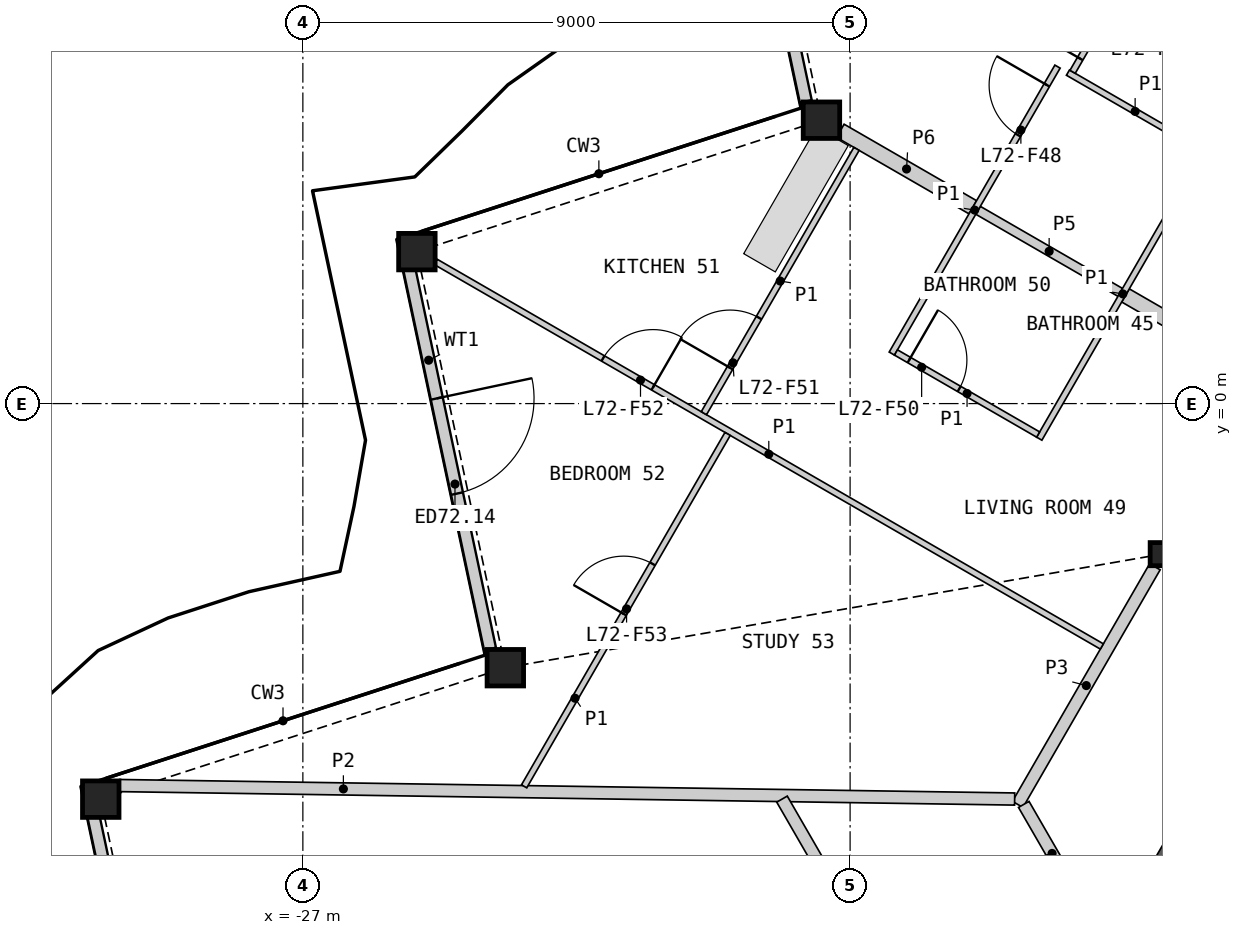
"""IFC4 building model, lengths in metres.
Left out: names, types, materials, properties, quantities, classifications, styles, units other than length and angle.
Written with IfcOpenShell. Run it as: python <this file> out.ifc"""

import sys

from ifc_helpers import new_model, si_unit, direction, frame, frame_2d, origin, origin_2d, place, context, subcontext, project, spatial, polyline, rectangle, hollow_rectangle, i_section, outline, extrude, element, fill, save


model = new_model("IFC4")
c1 = context("Model", 3, precision=1e-05, world=origin(), true_north=direction((0.0, 1.0)))
c2 = subcontext(c1, "Body", "Model", "MODEL_VIEW")
j1 = project(units=[si_unit("LENGTHUNIT", "METRE"), si_unit("PLANEANGLEUNIT", "RADIAN")], contexts=[c1])
p1 = place(None, origin())
s1 = spatial("IfcSite", under=j1, at=p1, CompositionType="ELEMENT")
p2 = place(p1, origin())
s2 = spatial("IfcBuilding", under=s1, at=p2, CompositionType="ELEMENT")
p3 = place(p2, frame((0.0, 0.0, 325.6)))
s3 = spatial("IfcBuildingStorey", under=s2, at=p3, CompositionType="ELEMENT", Elevation=325.6)
for number, where, z_axis, x_axis in (
    (1, (-18.471, 4.661, 0.0), (0.0, 0.0, 1.0), (1.0, 0.0, 0.0)),
    (2, (-25.125, 2.499, 0.0), (0.0, 0.0, 1.0), (1.0, 0.0, 0.0)),
    (3, (-23.67, -4.344, 0.0), (0.0, 0.0, 1.0), (1.0, 0.0, 0.0)),
    (4, (-30.324, -6.506, 0.0), (0.0, 0.0, 1.0), (1.0, 0.0, 0.0)),
):
    element("IfcColumn", number, at=place(p3, frame(where, z_axis=z_axis, x_axis=x_axis)), inside=s3, PredefinedType="COLUMN", context=c2, shape_type="SweptSolid", body=[
        extrude(hollow_rectangle(XDim=0.6, YDim=0.6, WallThickness=0.04, at=origin_2d()), origin(), (0.0, 0.0, 1.0), 3.4),
    ])
p4 = place(p3, frame((-12.868, -2.476, 0.0), z_axis=(0.0, 0.0, 1.0), x_axis=(1.0, 0.0, 0.0)))
e5 = element("IfcColumn", 5, at=p4, inside=s3, PredefinedType="COLUMN", context=c2, shape_type="SweptSolid", body=[
    extrude(i_section(OverallWidth=0.396, OverallDepth=0.381, WebThickness=0.019, FlangeThickness=0.03, at=origin_2d()), origin(), (0.0, 0.0, 1.0), 3.4),
])
p5 = place(p3, frame((-20.073, 11.294, 0.0), z_axis=(0.0, 0.0, 1.0), x_axis=(0.207893978909, -0.978151365349, 0.0)))
e6 = element("IfcWall", 6, at=p5, inside=s3, PredefinedType="SOLIDWALL", context=c2, shape_type="SweptSolid", body=[
    extrude(rectangle(XDim=6.466, YDim=0.2, at=frame_2d((3.233, 0.0))), origin(), (0.0, 0.0, 1.0), 2.488),
])
p6 = place(p5, frame((2.261, 0.0, 0.0)))
e7 = element("IfcOpeningElement", 7, at=p6, cuts=e6, PredefinedType="OPENING", context=c2, shape_type="SweptSolid", body=[
    extrude(rectangle(XDim=1.6, YDim=2.25, at=frame_2d((0.8, 1.125))), frame((0.0, 0.11, 0.0), z_axis=(0.0, -1.0, 0.0), x_axis=(1.0, 0.0, 0.0)), (0.0, 0.0, 1.0), 0.22),
])
p7 = place(p3, frame((-25.268, 2.297, 0.0), z_axis=(0.0, 0.0, 1.0), x_axis=(0.207937232358, -0.978142171363, 0.0)))
e8 = element("IfcWall", 8, at=p7, inside=s3, PredefinedType="SOLIDWALL", context=c2, shape_type="SweptSolid", body=[
    extrude(rectangle(XDim=6.474, YDim=0.2, at=frame_2d((3.237, 0.0))), origin(), (0.0, 0.0, 1.0), 2.488),
])
p8 = place(p7, frame((2.261, 0.0, 0.0)))
e9 = element("IfcOpeningElement", 9, at=p8, cuts=e8, PredefinedType="OPENING", context=c2, shape_type="SweptSolid", body=[
    extrude(rectangle(XDim=1.6, YDim=2.25, at=frame_2d((0.8, 1.125))), frame((0.0, 0.11, 0.0), z_axis=(0.0, -1.0, 0.0), x_axis=(1.0, 0.0, 0.0)), (0.0, 0.0, 1.0), 0.22),
])
p9 = place(p3, frame((-30.462, -6.701, 0.0), z_axis=(0.0, 0.0, 1.0), x_axis=(0.207915966693, -0.978146691859, 0.0)))
e10 = element("IfcWall", 10, at=p9, inside=s3, PredefinedType="SOLIDWALL", context=c2, shape_type="SweptSolid", body=[
    extrude(rectangle(XDim=6.482, YDim=0.2, at=frame_2d((3.241, 0.0))), origin(), (0.0, 0.0, 1.0), 2.488),
])
p10 = place(p9, frame((2.261, 0.0, 0.0)))
e11 = element("IfcOpeningElement", 11, at=p10, cuts=e10, PredefinedType="OPENING", context=c2, shape_type="SweptSolid", body=[
    extrude(rectangle(XDim=1.6, YDim=2.25, at=frame_2d((0.8, 1.125))), frame((0.0, 0.11, 0.0), z_axis=(0.0, -1.0, 0.0), x_axis=(1.0, 0.0, 0.0)), (0.0, 0.0, 1.0), 0.22),
])
p11 = place(p3, origin())
e12 = element("IfcWall", 12, at=p11, inside=s3, PredefinedType="SHEAR", context=c2, shape_type="SweptSolid", body=[
    extrude(outline(polyline([(-12.48, -6.606), (-11.961, -6.906), (-11.961, -7.506), (-13.0, -7.506), (-12.48, -6.606)])), origin(), (0.0, 0.0, 1.0), 3.1),
])
p12 = place(p3, frame((-15.244, -6.592, 0.0), z_axis=(0.0, 0.0, 1.0), x_axis=(0.49999094734, 0.866030630277, 0.0)))
e13 = element("IfcWall", 13, at=p12, inside=s3, PredefinedType="PARTITIONING", context=c2, shape_type="SweptSolid", body=[
    extrude(rectangle(XDim=4.513, YDim=0.2, at=frame_2d((2.256, 0.0))), origin(), (0.0, 0.0, 1.0), 3.1),
])
p13 = place(p3, frame((-15.144, -6.592, 0.0), z_axis=(0.0, 0.0, 1.0), x_axis=(0.499958791762, -0.866049194065, 0.0)))
e14 = element("IfcWall", 14, at=p13, inside=s3, PredefinedType="PARTITIONING", context=c2, shape_type="SweptSolid", body=[
    extrude(rectangle(XDim=3.726, YDim=0.2, at=frame_2d((1.863, 0.0))), origin(), (0.0, 0.0, 1.0), 3.1),
])
p14 = place(p13, frame((1.388, 0.0, 0.0)))
e15 = element("IfcOpeningElement", 15, at=p14, cuts=e14, PredefinedType="OPENING", context=c2, shape_type="SweptSolid", body=[
    extrude(rectangle(XDim=0.95, YDim=2.1, at=frame_2d((0.475, 1.05))), frame((0.0, 0.11, 0.0), z_axis=(0.0, -1.0, 0.0), x_axis=(1.0, 0.0, 0.0)), (0.0, 0.0, 1.0), 0.22),
])
p15 = place(p3, frame((-13.471, 1.779, 0.0), z_axis=(0.0, 0.0, 1.0), x_axis=(0.865989465428, -0.500062241894, 0.0)))
e16 = element("IfcWall", 16, at=p15, inside=s3, PredefinedType="PARTITIONING", context=c2, shape_type="SweptSolid", body=[
    extrude(rectangle(XDim=2.55, YDim=0.25, at=frame_2d((1.275, 0.0))), origin(), (0.0, 0.0, 1.0), 2.33),
])
p16 = place(p3, frame((-18.161, 4.487, 0.0), z_axis=(0.0, 0.0, 1.0), x_axis=(0.866012646713, -0.500022095245, 0.0)))
e17 = element("IfcWall", 17, at=p16, inside=s3, PredefinedType="PARTITIONING", context=c2, shape_type="SweptSolid", body=[
    extrude(rectangle(XDim=2.516, YDim=0.25, at=frame_2d((1.258, 0.0))), origin(), (0.0, 0.0, 1.0), 2.33),
])
p17 = place(p3, frame((-30.014, -6.282, 0.0), z_axis=(0.0, 0.0, 1.0), x_axis=(0.99988686643, -0.015041753265, 0.0)))
e18 = element("IfcWall", 18, at=p17, inside=s3, PredefinedType="PARTITIONING", context=c2, shape_type="SweptSolid", body=[
    extrude(rectangle(XDim=14.721, YDim=0.2, at=frame_2d((7.361, 0.0))), origin(), (0.0, 0.0, 1.0), 2.33),
])
p18 = place(p3, frame((-19.12, -6.506, 0.0), z_axis=(0.0, 0.0, 1.0), x_axis=(0.499978535015, -0.866037796245, 0.0)))
e19 = element("IfcWall", 19, at=p18, inside=s3, PredefinedType="PARTITIONING", context=c2, shape_type="SweptSolid", body=[
    extrude(rectangle(XDim=3.686, YDim=0.2, at=frame_2d((1.843, 0.0))), origin(), (0.0, 0.0, 1.0), 2.33),
])
p19 = place(p3, frame((-15.896, 3.179, 0.0), z_axis=(0.0, 0.0, 1.0), x_axis=(0.866059108428, -0.4999416173, 0.0)))
e20 = element("IfcWall", 20, at=p19, inside=s3, PredefinedType="PLUMBINGWALL", context=c2, shape_type="SweptSolid", body=[
    extrude(rectangle(XDim=2.7, YDim=0.15, at=frame_2d((1.35, 0.0))), origin(), (0.0, 0.0, 1.0), 2.33),
])
p20 = place(p3, frame((-24.815, 2.33, 0.0), z_axis=(0.0, 0.0, 1.0), x_axis=(0.866027776657, -0.499995890042, 0.0)))
e21 = element("IfcWall", 21, at=p20, inside=s3, PredefinedType="PARTITIONING", context=c2, shape_type="SweptSolid", body=[
    extrude(rectangle(XDim=12.649, YDim=0.1, at=frame_2d((6.325, 0.0))), origin(), (0.0, 0.0, 1.0), 2.33),
])
p21 = place(p20, frame((3.176, 0.0, 0.0)))
e22 = element("IfcOpeningElement", 22, at=p21, cuts=e21, PredefinedType="OPENING", context=c2, shape_type="SweptSolid", body=[
    extrude(rectangle(XDim=0.95, YDim=2.1, at=frame_2d((0.475, 1.05))), frame((0.0, 0.06, 0.0), z_axis=(0.0, -1.0, 0.0), x_axis=(1.0, 0.0, 0.0)), (0.0, 0.0, 1.0), 0.12),
])
p22 = place(p3, frame((-19.615, 11.325, 0.0), z_axis=(0.0, 0.0, 1.0), x_axis=(0.86602139559, -0.500006942333, 0.0)))
e23 = element("IfcWall", 23, at=p22, inside=s3, PredefinedType="PARTITIONING", context=c2, shape_type="SweptSolid", body=[
    extrude(rectangle(XDim=12.505, YDim=0.1, at=frame_2d((6.252, 0.0))), origin(), (0.0, 0.0, 1.0), 2.33),
])
p23 = place(p22, frame((6.28, 0.0, 0.0)))
e24 = element("IfcOpeningElement", 24, at=p23, cuts=e23, PredefinedType="OPENING", context=c2, shape_type="SweptSolid", body=[
    extrude(rectangle(XDim=0.95, YDim=2.1, at=frame_2d((0.475, 1.05))), frame((0.0, 0.06, 0.0), z_axis=(0.0, -1.0, 0.0), x_axis=(1.0, 0.0, 0.0)), (0.0, 0.0, 1.0), 0.12),
])
p24 = place(p3, frame((-23.361, -6.295, 0.0), z_axis=(0.0, 0.0, 1.0), x_axis=(0.499987686533, 0.866032512851, 0.0)))
e25 = element("IfcWall", 25, at=p24, inside=s3, PredefinedType="PARTITIONING", context=c2, shape_type="SweptSolid", body=[
    extrude(rectangle(XDim=6.693, YDim=0.1, at=frame_2d((3.347, 0.0))), origin(), (0.0, 0.0, 1.0), 2.33),
])
p25 = place(p24, frame((3.275, 0.0, 0.0)))
e26 = element("IfcOpeningElement", 26, at=p25, cuts=e25, PredefinedType="OPENING", context=c2, shape_type="SweptSolid", body=[
    extrude(rectangle(XDim=0.95, YDim=2.1, at=frame_2d((0.475, 1.05))), frame((0.0, 0.06, 0.0), z_axis=(0.0, -1.0, 0.0), x_axis=(1.0, 0.0, 0.0)), (0.0, 0.0, 1.0), 0.12),
])
p26 = place(p3, frame((-17.314, 0.823, 0.0), z_axis=(0.0, 0.0, 1.0), x_axis=(0.499988730927, 0.866031909889, 0.0)))
e27 = element("IfcWall", 27, at=p26, inside=s3, PredefinedType="PARTITIONING", context=c2, shape_type="SweptSolid", body=[
    extrude(rectangle(XDim=5.45, YDim=0.1, at=frame_2d((2.725, 0.0))), origin(), (0.0, 0.0, 1.0), 2.33),
])
p27 = place(p26, frame((4.15, 0.0, 0.0)))
e28 = element("IfcOpeningElement", 28, at=p27, cuts=e27, PredefinedType="OPENING", context=c2, shape_type="SweptSolid", body=[
    extrude(rectangle(XDim=0.95, YDim=2.1, at=frame_2d((0.475, 1.05))), frame((0.0, 0.06, 0.0), z_axis=(0.0, -1.0, 0.0), x_axis=(1.0, 0.0, 0.0)), (0.0, 0.0, 1.0), 0.12),
])
p28 = place(p3, frame((-14.889, -0.577, 0.0), z_axis=(0.0, 0.0, 1.0), x_axis=(0.500015767406, 0.866016300277, 0.0)))
e29 = element("IfcWall", 29, at=p28, inside=s3, PredefinedType="PARTITIONING", context=c2, shape_type="SweptSolid", body=[
    extrude(rectangle(XDim=5.5, YDim=0.1, at=frame_2d((2.75, 0.0))), origin(), (0.0, 0.0, 1.0), 2.33),
])
p29 = place(p3, frame((-20.405, -0.158, 0.0), z_axis=(0.0, 0.0, 1.0), x_axis=(0.499989096993, 0.866031698547, 0.0)))
e30 = element("IfcWall", 30, at=p29, inside=s3, PredefinedType="PARTITIONING", context=c2, shape_type="SweptSolid", body=[
    extrude(rectangle(XDim=5.02, YDim=0.1, at=frame_2d((2.51, 0.0))), origin(), (0.0, 0.0, 1.0), 2.33),
])
p30 = place(p29, frame((0.862, 0.0, 0.0)))
e31 = element("IfcOpeningElement", 31, at=p30, cuts=e30, PredefinedType="OPENING", context=c2, shape_type="SweptSolid", body=[
    extrude(rectangle(XDim=0.95, YDim=2.1, at=frame_2d((0.475, 1.05))), frame((0.0, 0.06, 0.0), z_axis=(0.0, -1.0, 0.0), x_axis=(1.0, 0.0, 0.0)), (0.0, 0.0, 1.0), 0.12),
])
p31 = place(p3, frame((-17.246, 0.841, 0.0), z_axis=(0.0, 0.0, 1.0), x_axis=(0.86599734893, -0.500048589285, 0.0)))
e32 = element("IfcWall", 32, at=p31, inside=s3, PredefinedType="PARTITIONING", context=c2, shape_type="SweptSolid", body=[
    extrude(rectangle(XDim=2.7, YDim=0.1, at=frame_2d((1.35, 0.0))), origin(), (0.0, 0.0, 1.0), 2.33),
])
p32 = place(p31, frame((0.25, 0.0, 0.0)))
e33 = element("IfcOpeningElement", 33, at=p32, cuts=e32, PredefinedType="OPENING", context=c2, shape_type="SweptSolid", body=[
    extrude(rectangle(XDim=0.95, YDim=2.1, at=frame_2d((0.475, 1.05))), frame((0.0, 0.06, 0.0), z_axis=(0.0, -1.0, 0.0), x_axis=(1.0, 0.0, 0.0)), (0.0, 0.0, 1.0), 0.12),
])
p33 = place(p3, frame((-14.417, 5.443, 0.0), z_axis=(0.0, 0.0, 1.0), x_axis=(0.865991210529, -0.500059219779, 0.0)))
e34 = element("IfcWall", 34, at=p33, inside=s3, PredefinedType="PARTITIONING", context=c2, shape_type="SweptSolid", body=[
    extrude(rectangle(XDim=2.552, YDim=0.1, at=frame_2d((1.276, 0.0))), origin(), (0.0, 0.0, 1.0), 2.33),
])
p34 = place(p3, frame((-14.341, 5.457, 0.0), z_axis=(0.0, 0.0, 1.0), x_axis=(0.499954846121, 0.866051471819, 0.0)))
e35 = element("IfcWall", 35, at=p34, inside=s3, PredefinedType="PARTITIONING", context=c2, shape_type="SweptSolid", body=[
    extrude(rectangle(XDim=2.395, YDim=0.1, at=frame_2d((1.197, 0.0))), origin(), (0.0, 0.0, 1.0), 2.33),
])
p35 = place(p34, frame((0.25, 0.0, 0.0)))
e36 = element("IfcOpeningElement", 36, at=p35, cuts=e35, PredefinedType="OPENING", context=c2, shape_type="SweptSolid", body=[
    extrude(rectangle(XDim=0.95, YDim=2.1, at=frame_2d((0.475, 1.05))), frame((0.0, 0.06, 0.0), z_axis=(0.0, -1.0, 0.0), x_axis=(1.0, 0.0, 0.0)), (0.0, 0.0, 1.0), 0.12),
])
p36 = place(p8, origin())
e37 = element("IfcDoor", 37, at=p36, inside=s3, OperationType="DOUBLE_DOOR_SINGLE_SWING", PredefinedType="DOOR", context=c2, shape_type="SweptSolid", body=[
    extrude(rectangle(XDim=1.6, YDim=2.25, at=frame_2d((0.8, 1.125))), frame((0.0, 0.025, 0.0), z_axis=(0.0, -1.0, 0.0), x_axis=(1.0, 0.0, 0.0)), (0.0, 0.0, 1.0), 0.05),
])
fill(e9, e37)
p37 = place(p35, origin())
e38 = element("IfcDoor", 38, at=p37, inside=s3, OperationType="SINGLE_SWING_LEFT", PredefinedType="DOOR", context=c2, shape_type="SweptSolid", body=[
    extrude(rectangle(XDim=0.95, YDim=2.1, at=frame_2d((0.475, 1.05))), frame((0.0, 0.025, 0.0), z_axis=(0.0, -1.0, 0.0), x_axis=(1.0, 0.0, 0.0)), (0.0, 0.0, 1.0), 0.05),
])
fill(e36, e38)
p38 = place(p27, origin())
e39 = element("IfcDoor", 39, at=p38, inside=s3, OperationType="SINGLE_SWING_RIGHT", PredefinedType="DOOR", context=c2, shape_type="SweptSolid", body=[
    extrude(rectangle(XDim=0.95, YDim=2.1, at=frame_2d((0.475, 1.05))), frame((0.0, 0.025, 0.0), z_axis=(0.0, -1.0, 0.0), x_axis=(1.0, 0.0, 0.0)), (0.0, 0.0, 1.0), 0.05),
])
fill(e28, e39)
p39 = place(p32, origin())
e40 = element("IfcDoor", 40, at=p39, inside=s3, OperationType="SINGLE_SWING_LEFT", PredefinedType="DOOR", context=c2, shape_type="SweptSolid", body=[
    extrude(rectangle(XDim=0.95, YDim=2.1, at=frame_2d((0.475, 1.05))), frame((0.0, 0.025, 0.0), z_axis=(0.0, -1.0, 0.0), x_axis=(1.0, 0.0, 0.0)), (0.0, 0.0, 1.0), 0.05),
])
fill(e33, e40)
p40 = place(p30, origin())
e41 = element("IfcDoor", 41, at=p40, inside=s3, OperationType="SINGLE_SWING_LEFT", PredefinedType="DOOR", context=c2, shape_type="SweptSolid", body=[
    extrude(rectangle(XDim=0.95, YDim=2.1, at=frame_2d((0.475, 1.05))), frame((0.0, 0.025, 0.0), z_axis=(0.0, -1.0, 0.0), x_axis=(1.0, 0.0, 0.0)), (0.0, 0.0, 1.0), 0.05),
])
fill(e31, e41)
p41 = place(p21, origin())
e42 = element("IfcDoor", 42, at=p41, inside=s3, OperationType="SINGLE_SWING_RIGHT", PredefinedType="DOOR", context=c2, shape_type="SweptSolid", body=[
    extrude(rectangle(XDim=0.95, YDim=2.1, at=frame_2d((0.475, 1.05))), frame((0.0, 0.025, 0.0), z_axis=(0.0, -1.0, 0.0), x_axis=(1.0, 0.0, 0.0)), (0.0, 0.0, 1.0), 0.05),
])
fill(e22, e42)
p42 = place(p25, origin())
e43 = element("IfcDoor", 43, at=p42, inside=s3, OperationType="SINGLE_SWING_LEFT", PredefinedType="DOOR", context=c2, shape_type="SweptSolid", body=[
    extrude(rectangle(XDim=0.95, YDim=2.1, at=frame_2d((0.475, 1.05))), frame((0.0, 0.025, 0.0), z_axis=(0.0, -1.0, 0.0), x_axis=(1.0, 0.0, 0.0)), (0.0, 0.0, 1.0), 0.05),
])
fill(e26, e43)
save(model, sys.argv[1])
